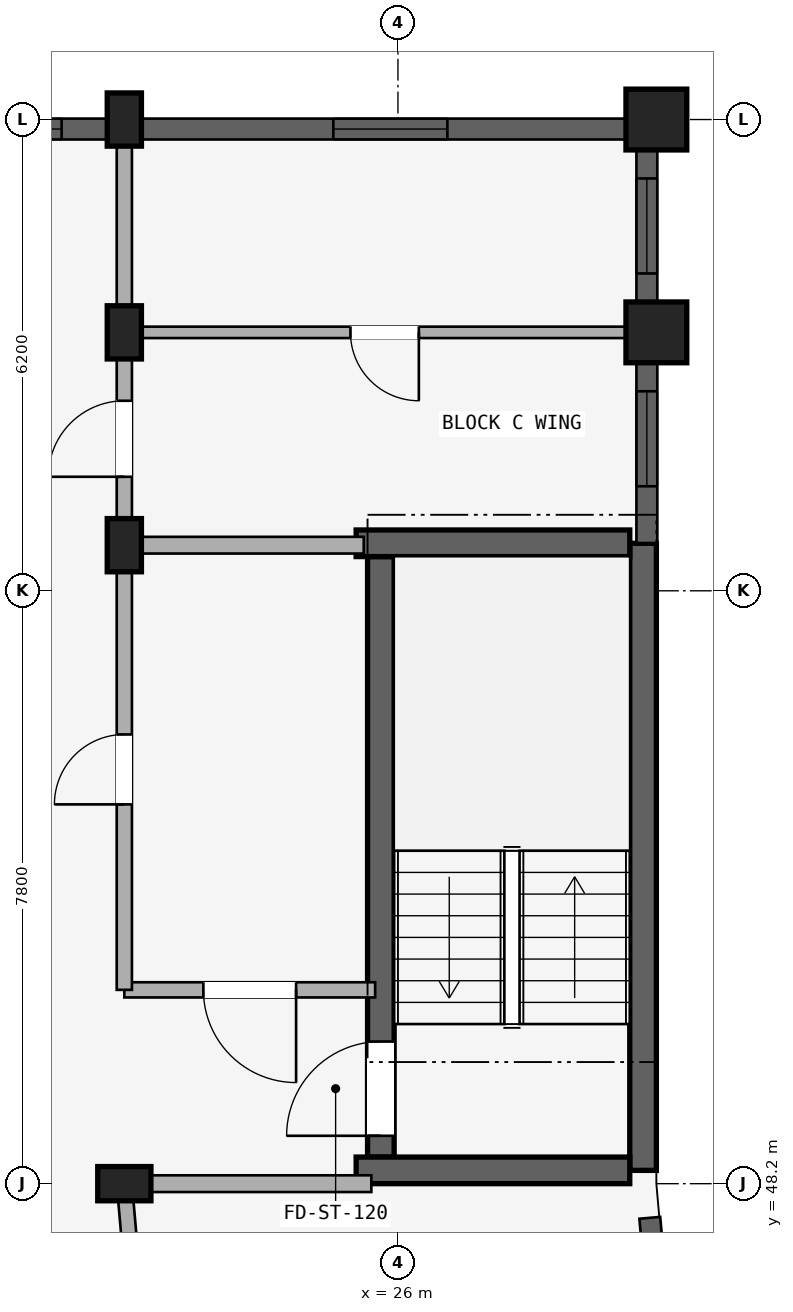
"""IFC4 building model, lengths in metres.
Left out: names, types, materials, properties, quantities, classifications, styles, units other than length and angle.
Written with IfcOpenShell. Run it as: python <this file> out.ifc"""

import sys

from ifc_helpers import new_model, si_unit, direction, frame, frame_2d, origin, origin_2d, place, context, subcontext, project, spatial, rectangle, extrude, element, fill, save


model = new_model("IFC4")
c1 = context("Model", 3, precision=1e-05, world=origin(), true_north=direction((0.0, 1.0)))
c2 = subcontext(c1, "Body", "Model", "MODEL_VIEW")
j1 = project(units=[si_unit("LENGTHUNIT", "METRE"), si_unit("PLANEANGLEUNIT", "RADIAN")], contexts=[c1])
p1 = place(None, origin())
s1 = spatial("IfcSite", under=j1, at=p1, CompositionType="ELEMENT")
p2 = place(p1, origin())
s2 = spatial("IfcBuilding", under=s1, at=p2, CompositionType="ELEMENT")
p3 = place(p2, frame((0.0, 0.0, 11.85)))
s3 = spatial("IfcBuildingStorey", under=s2, at=p3, CompositionType="ELEMENT", Elevation=11.85)
p4 = place(p3, frame((29.225, 48.375, 0.0), z_axis=(0.0, 0.0, 1.0), x_axis=(0.0, 1.0, 0.0)))
e1 = element("IfcWall", 1, at=p4, inside=s3, PredefinedType="SHEAR", context=c2, shape_type="SweptSolid", body=[
    extrude(rectangle(XDim=8.25, YDim=0.35, at=frame_2d((4.125, 0.0))), origin(), (0.0, 0.0, 1.0), 2.93),
])
p5 = place(p3, frame((25.775, 48.55, 0.0), z_axis=(0.0, 0.0, 1.0), x_axis=(0.0, 1.0, 0.0)))
e2 = element("IfcWall", 2, at=p5, inside=s3, PredefinedType="SHEAR", context=c2, shape_type="SweptSolid", body=[
    extrude(rectangle(XDim=7.9, YDim=0.35, at=frame_2d((3.95, 0.0))), origin(), (0.0, 0.0, 1.0), 2.93),
])
p6 = place(p5, frame((0.28, 0.0, 0.0)))
e3 = element("IfcOpeningElement", 3, at=p6, cuts=e2, PredefinedType="OPENING", context=c2, shape_type="SweptSolid", body=[
    extrude(rectangle(XDim=1.24, YDim=2.15, at=frame_2d((0.62, 1.075))), frame((0.0, 0.185, 0.0), z_axis=(0.0, -1.0, 0.0), x_axis=(1.0, 0.0, 0.0)), (0.0, 0.0, 1.0), 0.37),
])
for number, where, z_axis, x_axis in (
    (4, (29.05, 48.375, 0.0), (0.0, 0.0, 1.0), (-1.0, 0.0, 0.0)),
    (5, (29.05, 56.625, 0.0), (0.0, 0.0, 1.0), (-1.0, 0.0, 0.0)),
):
    element("IfcWall", number, at=place(p3, frame(where, z_axis=z_axis, x_axis=x_axis)), inside=s3, PredefinedType="SHEAR", context=c2, shape_type="SweptSolid", body=[
        extrude(rectangle(XDim=3.6, YDim=0.35, at=frame_2d((1.8, 0.0))), origin(), (0.0, 0.0, 1.0), 2.93),
    ])
for number, where, z_axis, x_axis in (
    (6, (22.4, 48.2, 0.0), (0.0, 0.0, 1.0), (0.0, 1.0, 0.0)),
    (7, (22.4, 56.6, 0.0), (0.0, 0.0, 1.0), (1.0, 0.0, 0.0)),
):
    element("IfcColumn", number, at=place(p3, frame(where, z_axis=z_axis, x_axis=x_axis)), inside=s3, PredefinedType="COLUMN", context=c2, shape_type="SweptSolid", body=[
        extrude(rectangle(XDim=0.45, YDim=0.7, at=origin_2d()), origin(), (0.0, 0.0, 1.0), 2.93),
    ])
p7 = place(p3, frame((29.4, 59.4, 0.0), z_axis=(0.0, 0.0, 1.0), x_axis=(1.0, 0.0, 0.0)))
e8 = element("IfcColumn", 8, at=p7, inside=s3, PredefinedType="COLUMN", context=c2, shape_type="SweptSolid", body=[
    extrude(rectangle(XDim=0.8, YDim=0.8, at=origin_2d()), origin(), (0.0, 0.0, 1.0), 2.93),
])
p8 = place(p3, frame((22.4, 59.4, 0.0), z_axis=(0.0, 0.0, 1.0), x_axis=(1.0, 0.0, 0.0)))
e9 = element("IfcColumn", 9, at=p8, inside=s3, PredefinedType="COLUMN", context=c2, shape_type="SweptSolid", body=[
    extrude(rectangle(XDim=0.45, YDim=0.7, at=origin_2d()), origin(), (0.0, 0.0, 1.0), 2.93),
])
p9 = place(p3, frame((29.4, 62.2, 0.0), z_axis=(0.0, 0.0, 1.0), x_axis=(1.0, 0.0, 0.0)))
e10 = element("IfcColumn", 10, at=p9, inside=s3, PredefinedType="COLUMN", context=c2, shape_type="SweptSolid", body=[
    extrude(rectangle(XDim=0.8, YDim=0.8, at=origin_2d()), origin(), (0.0, 0.0, 1.0), 2.93),
])
p10 = place(p3, frame((22.4, 62.2, 0.0), z_axis=(0.0, 0.0, 1.0), x_axis=(1.0, 0.0, 0.0)))
e11 = element("IfcColumn", 11, at=p10, inside=s3, PredefinedType="COLUMN", context=c2, shape_type="SweptSolid", body=[
    extrude(rectangle(XDim=0.45, YDim=0.7, at=origin_2d()), origin(), (0.0, 0.0, 1.0), 2.93),
])
p11 = place(p3, frame((25.7, 50.75, 0.0), z_axis=(0.0, 0.0, 1.0), x_axis=(-1.0, 0.0, 0.0)))
e12 = element("IfcWall", 12, at=p11, inside=s3, PredefinedType="STANDARD", context=c2, shape_type="SweptSolid", body=[
    extrude(rectangle(XDim=3.3, YDim=0.2, at=frame_2d((1.65, 0.0))), origin(), (0.0, 0.0, 1.0), 2.372),
])
p12 = place(p11, frame((1.04, 0.0, 0.0)))
e13 = element("IfcOpeningElement", 13, at=p12, cuts=e12, PredefinedType="OPENING", context=c2, shape_type="SweptSolid", body=[
    extrude(rectangle(XDim=1.22, YDim=2.15, at=frame_2d((0.61, 1.075))), frame((0.0, 0.11, 0.0), z_axis=(0.0, -1.0, 0.0), x_axis=(1.0, 0.0, 0.0)), (0.0, 0.0, 1.0), 0.22),
])
p13 = place(p3, frame((22.4, 50.75, 0.0), z_axis=(0.0, 0.0, 1.0), x_axis=(0.0, 1.0, 0.0)))
e14 = element("IfcWall", 14, at=p13, inside=s3, PredefinedType="STANDARD", context=c2, shape_type="SweptSolid", body=[
    extrude(rectangle(XDim=5.8, YDim=0.2, at=frame_2d((2.9, 0.0))), origin(), (0.0, 0.0, 1.0), 2.372),
])
p14 = place(p13, frame((2.44, 0.0, 0.0)))
e15 = element("IfcOpeningElement", 15, at=p14, cuts=e14, PredefinedType="OPENING", context=c2, shape_type="SweptSolid", body=[
    extrude(rectangle(XDim=0.92, YDim=2.1, at=frame_2d((0.46, 1.05))), frame((0.0, 0.11, 0.0), z_axis=(0.0, -1.0, 0.0), x_axis=(1.0, 0.0, 0.0)), (0.0, 0.0, 1.0), 0.22),
])
p15 = place(p3, frame((22.792, 43.72, 0.0), z_axis=(0.0, 0.0, 1.0), x_axis=(-0.087187153726, 0.996191949488, 0.0)))
e16 = element("IfcWall", 16, at=p15, inside=s3, PredefinedType="STANDARD", context=c2, shape_type="SweptSolid", body=[
    extrude(rectangle(XDim=4.497, YDim=0.2, at=frame_2d((2.249, 0.0))), origin(), (0.0, 0.0, 1.0), 2.372),
])
p16 = place(p3, frame((25.65, 48.2, 0.0), z_axis=(0.0, 0.0, 1.0), x_axis=(-1.0, 0.0, 0.0)))
e17 = element("IfcWall", 17, at=p16, inside=s3, PredefinedType="STANDARD", context=c2, shape_type="SweptSolid", body=[
    extrude(rectangle(XDim=3.2, YDim=0.22, at=frame_2d((1.6, 0.0))), origin(), (0.0, 0.0, 1.0), 2.372),
])
p17 = place(p3, frame((22.4, 56.6, 0.0), z_axis=(0.0, 0.0, 1.0), x_axis=(0.0, 1.0, 0.0)))
e18 = element("IfcWall", 18, at=p17, inside=s3, PredefinedType="STANDARD", context=c2, shape_type="SweptSolid", body=[
    extrude(rectangle(XDim=2.8, YDim=0.2, at=frame_2d((1.4, 0.0))), origin(), (0.0, 0.0, 1.0), 2.372),
])
p18 = place(p17, frame((0.9, 0.0, 0.0)))
e19 = element("IfcOpeningElement", 19, at=p18, cuts=e18, PredefinedType="OPENING", context=c2, shape_type="SweptSolid", body=[
    extrude(rectangle(XDim=1.0, YDim=2.15, at=frame_2d((0.5, 1.075))), frame((0.0, 0.11, 0.0), z_axis=(0.0, -1.0, 0.0), x_axis=(1.0, 0.0, 0.0)), (0.0, 0.0, 1.0), 0.22),
])
p19 = place(p3, frame((25.55, 56.6, 0.0), z_axis=(0.0, 0.0, 1.0), x_axis=(-1.0, 0.0, 0.0)))
e20 = element("IfcWall", 20, at=p19, inside=s3, PredefinedType="STANDARD", context=c2, shape_type="SweptSolid", body=[
    extrude(rectangle(XDim=3.1, YDim=0.22, at=frame_2d((1.55, 0.0))), origin(), (0.0, 0.0, 1.0), 2.372),
])
p20 = place(p3, frame((22.4, 59.4, 0.0), z_axis=(0.0, 0.0, 1.0), x_axis=(0.0, 1.0, 0.0)))
e21 = element("IfcWall", 21, at=p20, inside=s3, PredefinedType="STANDARD", context=c2, shape_type="SweptSolid", body=[
    extrude(rectangle(XDim=2.8, YDim=0.2, at=frame_2d((1.4, 0.0))), origin(), (0.0, 0.0, 1.0), 2.372),
])
p21 = place(p3, frame((29.2, 59.4, 0.0), z_axis=(0.0, 0.0, 1.0), x_axis=(-1.0, 0.0, 0.0)))
e22 = element("IfcWall", 22, at=p21, inside=s3, PredefinedType="PARTITIONING", context=c2, shape_type="SweptSolid", body=[
    extrude(rectangle(XDim=6.75, YDim=0.15, at=frame_2d((3.375, 0.0))), origin(), (0.0, 0.0, 1.0), 2.372),
])
p22 = place(p21, frame((2.925, 0.0, 0.0)))
e23 = element("IfcOpeningElement", 23, at=p22, cuts=e22, PredefinedType="OPENING", context=c2, shape_type="SweptSolid", body=[
    extrude(rectangle(XDim=0.9, YDim=2.1, at=frame_2d((0.45, 1.05))), frame((0.0, 0.085, 0.0), z_axis=(0.0, -1.0, 0.0), x_axis=(1.0, 0.0, 0.0)), (0.0, 0.0, 1.0), 0.17),
])
p23 = place(p3, frame((29.537, 45.203, 0.0), z_axis=(0.0, 0.0, 1.0), x_axis=(-0.08716102895, 0.996194235595, 0.0)))
e24 = element("IfcWall", 24, at=p23, inside=s3, PredefinedType="STANDARD", context=c2, shape_type="SweptSolid", body=[
    extrude(rectangle(XDim=2.557, YDim=0.275, at=frame_2d((1.279, 0.0))), origin(), (0.0, 0.0, 1.0), 2.422),
])
p24 = place(p23, frame((0.759, 0.0, 0.722)))
e25 = element("IfcOpeningElement", 25, at=p24, cuts=e24, PredefinedType="OPENING", context=c2, shape_type="SweptSolid", body=[
    extrude(rectangle(XDim=1.2, YDim=1.5, at=frame_2d((0.6, 0.75))), frame((0.0, 0.147, 0.0), z_axis=(0.0, -1.0, 0.0), x_axis=(1.0, 0.0, 0.0)), (0.0, 0.0, 1.0), 0.295),
])
p25 = place(p3, frame((29.275, 56.628, 0.0), z_axis=(0.0, 0.0, 1.0), x_axis=(0.0, 1.0, 0.0)))
e26 = element("IfcWall", 26, at=p25, inside=s3, PredefinedType="STANDARD", context=c2, shape_type="SweptSolid", body=[
    extrude(rectangle(XDim=2.368, YDim=0.275, at=frame_2d((1.184, 0.0))), origin(), (0.0, 0.0, 1.0), 2.472),
])
p26 = place(p25, frame((0.747, 0.0, 0.722)))
e27 = element("IfcOpeningElement", 27, at=p26, cuts=e26, PredefinedType="OPENING", context=c2, shape_type="SweptSolid", body=[
    extrude(rectangle(XDim=1.25, YDim=1.55, at=frame_2d((0.625, 0.775))), frame((0.0, 0.147, 0.0), z_axis=(0.0, -1.0, 0.0), x_axis=(1.0, 0.0, 0.0)), (0.0, 0.0, 1.0), 0.295),
])
p27 = place(p3, frame((29.275, 59.803, 0.0), z_axis=(0.0, 0.0, 1.0), x_axis=(0.0, 1.0, 0.0)))
e28 = element("IfcWall", 28, at=p27, inside=s3, PredefinedType="STANDARD", context=c2, shape_type="SweptSolid", body=[
    extrude(rectangle(XDim=1.993, YDim=0.275, at=frame_2d((0.997, 0.0))), origin(), (0.0, 0.0, 1.0), 2.472),
])
p28 = place(p27, frame((0.372, 0.0, 0.722)))
e29 = element("IfcOpeningElement", 29, at=p28, cuts=e28, PredefinedType="OPENING", context=c2, shape_type="SweptSolid", body=[
    extrude(rectangle(XDim=1.25, YDim=1.55, at=frame_2d((0.625, 0.775))), frame((0.0, 0.147, 0.0), z_axis=(0.0, -1.0, 0.0), x_axis=(1.0, 0.0, 0.0)), (0.0, 0.0, 1.0), 0.295),
])
p29 = place(p3, frame((28.997, 62.075, 0.0), z_axis=(0.0, 0.0, 1.0), x_axis=(-1.0, 0.0, 0.0)))
e30 = element("IfcWall", 30, at=p29, inside=s3, PredefinedType="STANDARD", context=c2, shape_type="SweptSolid", body=[
    extrude(rectangle(XDim=6.368, YDim=0.275, at=frame_2d((3.184, 0.0))), origin(), (0.0, 0.0, 1.0), 2.372),
])
p30 = place(p29, frame((2.346, 0.0, 0.522)))
e31 = element("IfcOpeningElement", 31, at=p30, cuts=e30, PredefinedType="OPENING", context=c2, shape_type="SweptSolid", body=[
    extrude(rectangle(XDim=1.5, YDim=1.65, at=frame_2d((0.75, 0.825))), frame((0.0, 0.147, 0.0), z_axis=(0.0, -1.0, 0.0), x_axis=(1.0, 0.0, 0.0)), (0.0, 0.0, 1.0), 0.295),
])
p31 = place(p3, frame((22.171, 62.075, 0.0), z_axis=(0.0, 0.0, 1.0), x_axis=(-1.0, 0.0, 0.0)))
e32 = element("IfcWall", 32, at=p31, inside=s3, PredefinedType="STANDARD", context=c2, shape_type="SweptSolid", body=[
    extrude(rectangle(XDim=1.943, YDim=0.275, at=frame_2d((0.971, 0.0))), origin(), (0.0, 0.0, 1.0), 2.372),
])
p32 = place(p31, frame((0.596, 0.0, 0.88)))
e33 = element("IfcOpeningElement", 33, at=p32, cuts=e32, PredefinedType="OPENING", context=c2, shape_type="SweptSolid", body=[
    extrude(rectangle(XDim=0.75, YDim=1.05, at=frame_2d((0.375, 0.525))), frame((0.0, 0.147, 0.0), z_axis=(0.0, -1.0, 0.0), x_axis=(1.0, 0.0, 0.0)), (0.0, 0.0, 1.0), 0.295),
])
p33 = place(p26, origin())
e34 = element("IfcWindow", 34, at=p33, inside=s3, PartitioningType="SINGLE_PANEL", PredefinedType="WINDOW", context=c2, shape_type="SweptSolid", body=[
    extrude(rectangle(XDim=1.25, YDim=1.55, at=frame_2d((0.625, 0.775))), frame((0.0, 0.03, 0.0), z_axis=(0.0, -1.0, 0.0), x_axis=(1.0, 0.0, 0.0)), (0.0, 0.0, 1.0), 0.06),
])
fill(e27, e34)
p34 = place(p28, origin())
e35 = element("IfcWindow", 35, at=p34, inside=s3, PartitioningType="SINGLE_PANEL", PredefinedType="WINDOW", context=c2, shape_type="SweptSolid", body=[
    extrude(rectangle(XDim=1.25, YDim=1.55, at=frame_2d((0.625, 0.775))), frame((0.0, 0.03, 0.0), z_axis=(0.0, -1.0, 0.0), x_axis=(1.0, 0.0, 0.0)), (0.0, 0.0, 1.0), 0.06),
])
fill(e29, e35)
p35 = place(p30, origin())
e36 = element("IfcWindow", 36, at=p35, inside=s3, PartitioningType="DOUBLE_PANEL_VERTICAL", PredefinedType="WINDOW", context=c2, shape_type="SweptSolid", body=[
    extrude(rectangle(XDim=1.5, YDim=1.65, at=frame_2d((0.75, 0.825))), frame((0.0, 0.03, 0.0), z_axis=(0.0, -1.0, 0.0), x_axis=(1.0, 0.0, 0.0)), (0.0, 0.0, 1.0), 0.06),
])
fill(e31, e36)
p36 = place(p32, origin())
e37 = element("IfcWindow", 37, at=p36, inside=s3, PartitioningType="SINGLE_PANEL", PredefinedType="WINDOW", context=c2, shape_type="SweptSolid", body=[
    extrude(rectangle(XDim=0.75, YDim=1.05, at=frame_2d((0.375, 0.525))), frame((0.0, 0.03, 0.0), z_axis=(0.0, -1.0, 0.0), x_axis=(1.0, 0.0, 0.0)), (0.0, 0.0, 1.0), 0.06),
])
fill(e33, e37)
p37 = place(p6, frame((1.24, 0.0, 0.0), z_axis=(0.0, 0.0, 1.0), x_axis=(-1.0, 0.0, 0.0)))
e38 = element("IfcDoor", 38, at=p37, inside=s3, OperationType="SINGLE_SWING_RIGHT", PredefinedType="DOOR", context=c2, shape_type="SweptSolid", body=[
    extrude(rectangle(XDim=1.24, YDim=2.15, at=frame_2d((0.62, 1.075))), frame((0.0, 0.025, 0.0), z_axis=(0.0, -1.0, 0.0), x_axis=(1.0, 0.0, 0.0)), (0.0, 0.0, 1.0), 0.05),
])
fill(e3, e38)
p38 = place(p12, frame((1.22, 0.0, 0.0), z_axis=(0.0, 0.0, 1.0), x_axis=(-1.0, 0.0, 0.0)))
e39 = element("IfcDoor", 39, at=p38, inside=s3, OperationType="SINGLE_SWING_RIGHT", PredefinedType="DOOR", context=c2, shape_type="SweptSolid", body=[
    extrude(rectangle(XDim=1.22, YDim=2.15, at=frame_2d((0.61, 1.075))), frame((0.0, 0.025, 0.0), z_axis=(0.0, -1.0, 0.0), x_axis=(1.0, 0.0, 0.0)), (0.0, 0.0, 1.0), 0.05),
])
fill(e13, e39)
p39 = place(p14, origin())
e40 = element("IfcDoor", 40, at=p39, inside=s3, OperationType="SINGLE_SWING_LEFT", PredefinedType="DOOR", context=c2, shape_type="SweptSolid", body=[
    extrude(rectangle(XDim=0.92, YDim=2.1, at=frame_2d((0.46, 1.05))), frame((0.0, 0.025, 0.0), z_axis=(0.0, -1.0, 0.0), x_axis=(1.0, 0.0, 0.0)), (0.0, 0.0, 1.0), 0.05),
])
fill(e15, e40)
p40 = place(p18, frame((1.0, 0.0, 0.0), z_axis=(0.0, 0.0, 1.0), x_axis=(-1.0, 0.0, 0.0)))
e41 = element("IfcDoor", 41, at=p40, inside=s3, OperationType="SINGLE_SWING_RIGHT", PredefinedType="DOOR", context=c2, shape_type="SweptSolid", body=[
    extrude(rectangle(XDim=1.0, YDim=2.15, at=frame_2d((0.5, 1.075))), frame((0.0, 0.025, 0.0), z_axis=(0.0, -1.0, 0.0), x_axis=(1.0, 0.0, 0.0)), (0.0, 0.0, 1.0), 0.05),
])
fill(e19, e41)
p41 = place(p22, frame((0.9, 0.0, 0.0), z_axis=(0.0, 0.0, 1.0), x_axis=(-1.0, 0.0, 0.0)))
e42 = element("IfcDoor", 42, at=p41, inside=s3, OperationType="SINGLE_SWING_RIGHT", PredefinedType="DOOR", context=c2, shape_type="SweptSolid", body=[
    extrude(rectangle(XDim=0.9, YDim=2.1, at=frame_2d((0.45, 1.05))), frame((0.0, 0.025, 0.0), z_axis=(0.0, -1.0, 0.0), x_axis=(1.0, 0.0, 0.0)), (0.0, 0.0, 1.0), 0.05),
])
fill(e23, e42)
save(model, sys.argv[1])
